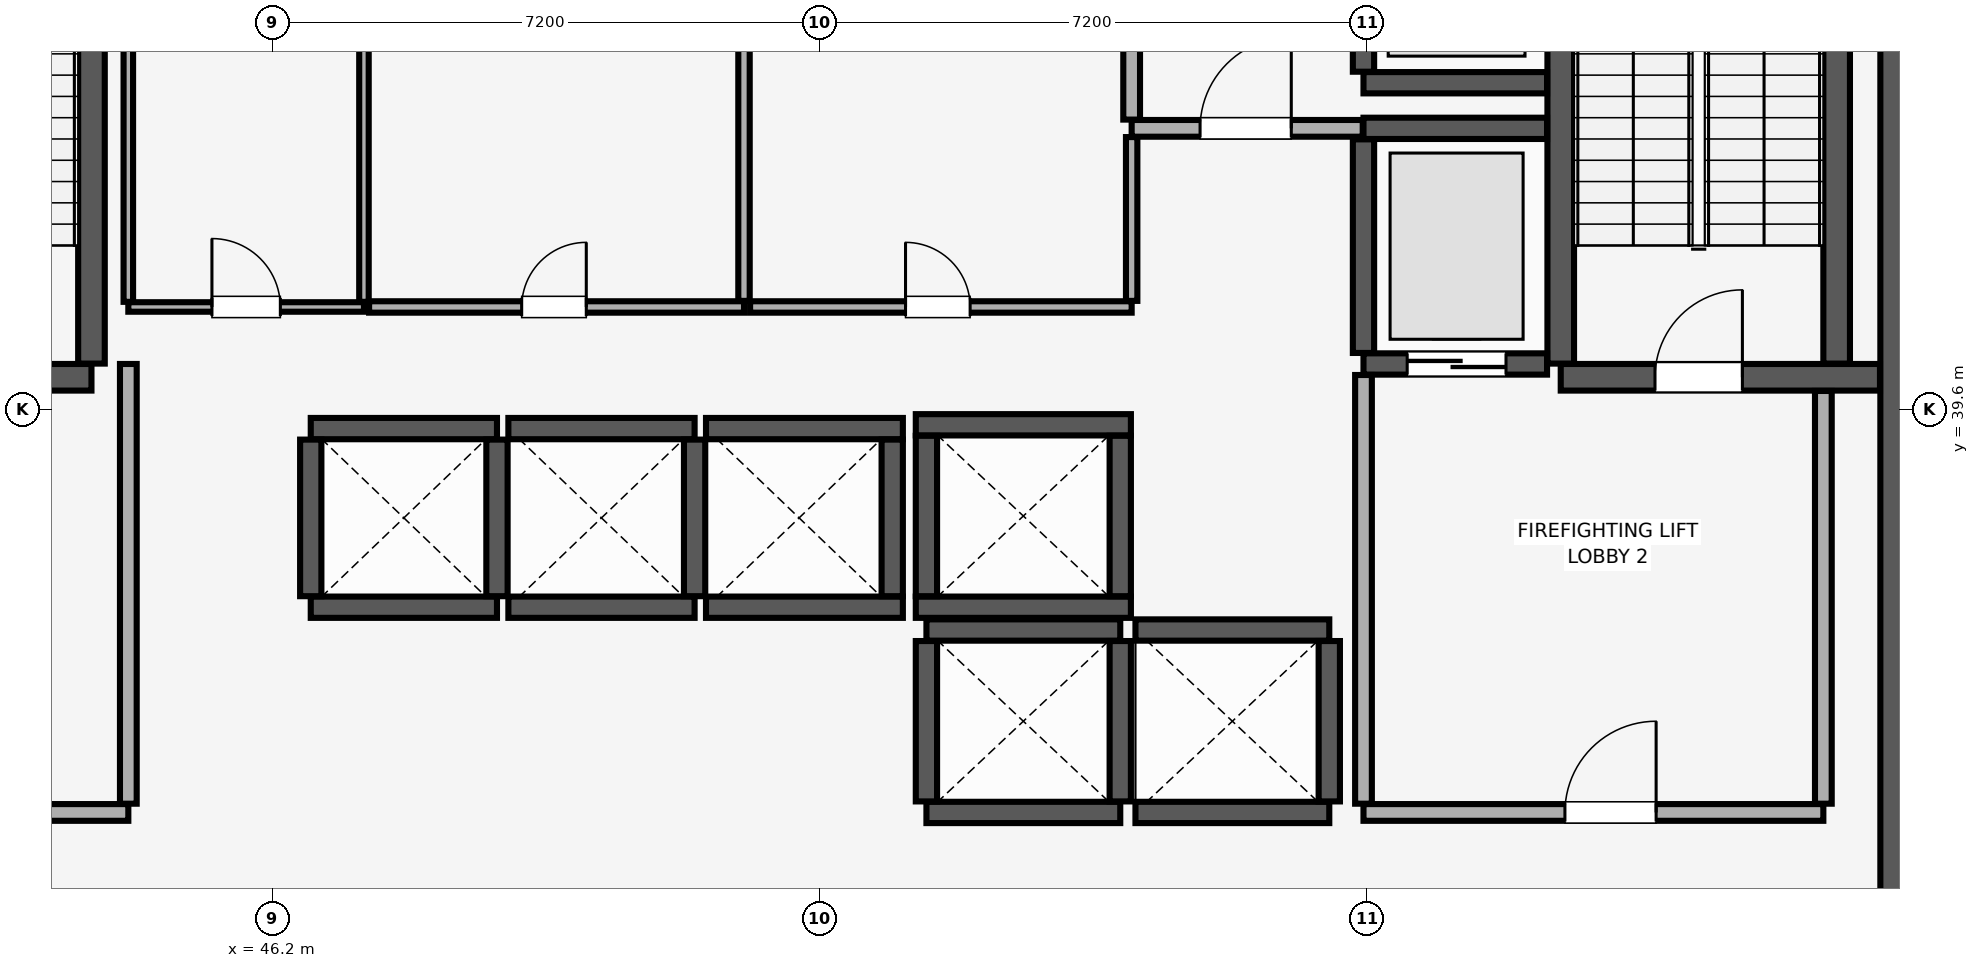
"""IFC4 building model, lengths in metres.
Left out: names, types, materials, properties, quantities, classifications, styles, units other than length and angle.
Written with IfcOpenShell. Run it as: python <this file> out.ifc"""

import sys

from ifc_helpers import new_model, si_unit, direction, frame, frame_2d, origin, place, context, subcontext, project, spatial, rectangle, extrude, element, fill, save


model = new_model("IFC4")
c1 = context("Model", 3, precision=1e-05, world=origin(), true_north=direction((0.0, 1.0)))
c2 = subcontext(c1, "Body", "Model", "MODEL_VIEW")
j1 = project(units=[si_unit("LENGTHUNIT", "METRE"), si_unit("PLANEANGLEUNIT", "RADIAN")], contexts=[c1])
p1 = place(None, origin())
s1 = spatial("IfcSite", under=j1, at=p1, CompositionType="ELEMENT")
p2 = place(p1, origin())
s2 = spatial("IfcBuilding", under=s1, at=p2, CompositionType="ELEMENT")
p3 = place(p2, frame((0.0, 0.0, 104.3)))
s3 = spatial("IfcBuildingStorey", under=s2, at=p3, CompositionType="ELEMENT", Elevation=104.3)
p4 = place(p3, frame((67.8, 29.4, 0.0), z_axis=(0.0, 0.0, 1.0), x_axis=(0.0, 1.0, 0.0)))
e1 = element("IfcWall", 1, at=p4, inside=s3, PredefinedType="SHEAR", context=c2, shape_type="SweptSolid", body=[
    extrude(rectangle(XDim=19.2, YDim=0.9, at=frame_2d((9.6, 0.0))), origin(), (0.0, 0.0, 1.0), 3.51),
])
p5 = place(p3, frame((40.185, 40.025, 0.0), z_axis=(0.0, 0.0, 1.0), x_axis=(1.0, 0.0, 0.0)))
e2 = element("IfcWall", 2, at=p5, inside=s3, PredefinedType="SHEAR", context=c2, shape_type="SweptSolid", body=[
    extrude(rectangle(XDim=3.63, YDim=0.35, at=frame_2d((1.815, 0.0))), origin(), (0.0, 0.0, 1.0), 3.51),
])
p6 = place(p5, frame((1.24, 0.0, 0.0)))
e3 = element("IfcOpeningElement", 3, at=p6, cuts=e2, PredefinedType="OPENING", context=c2, shape_type="SweptSolid", body=[
    extrude(rectangle(XDim=1.15, YDim=2.15, at=frame_2d((0.575, 1.075))), frame((0.0, 0.185, 0.0), z_axis=(0.0, -1.0, 0.0), x_axis=(1.0, 0.0, 0.0)), (0.0, 0.0, 1.0), 0.37),
])
p7 = place(p3, frame((43.815, 40.205, 0.0), z_axis=(0.0, 0.0, 1.0), x_axis=(0.0, 1.0, 0.0)))
e4 = element("IfcWall", 4, at=p7, inside=s3, PredefinedType="SHEAR", context=c2, shape_type="SweptSolid", body=[
    extrude(rectangle(XDim=8.09, YDim=0.35, at=frame_2d((4.045, 0.0))), origin(), (0.0, 0.0, 1.0), 3.51),
])
p8 = place(p3, frame((63.145, 40.025, 0.0), z_axis=(0.0, 0.0, 1.0), x_axis=(1.0, 0.0, 0.0)))
e5 = element("IfcWall", 5, at=p8, inside=s3, PredefinedType="SHEAR", context=c2, shape_type="SweptSolid", body=[
    extrude(rectangle(XDim=4.2, YDim=0.35, at=frame_2d((2.1, 0.0))), origin(), (0.0, 0.0, 1.0), 3.51),
])
p9 = place(p8, frame((1.24, 0.0, 0.0)))
e6 = element("IfcOpeningElement", 6, at=p9, cuts=e5, PredefinedType="OPENING", context=c2, shape_type="SweptSolid", body=[
    extrude(rectangle(XDim=1.15, YDim=2.15, at=frame_2d((0.575, 1.075))), frame((0.0, 0.185, 0.0), z_axis=(0.0, -1.0, 0.0), x_axis=(1.0, 0.0, 0.0)), (0.0, 0.0, 1.0), 0.37),
])
for number, where, z_axis, x_axis in (
    (7, (63.145, 40.205, 0.0), (0.0, 0.0, 1.0), (0.0, 1.0, 0.0)),
    (8, (66.775, 40.205, 0.0), (0.0, 0.0, 1.0), (0.0, 1.0, 0.0)),
):
    element("IfcWall", number, at=place(p3, frame(where, z_axis=z_axis, x_axis=x_axis)), inside=s3, PredefinedType="SHEAR", context=c2, shape_type="SweptSolid", body=[
        extrude(rectangle(XDim=8.09, YDim=0.35, at=frame_2d((4.045, 0.0))), origin(), (0.0, 0.0, 1.0), 3.51),
    ])
for number, where, z_axis, x_axis in (
    (9, (46.7, 37.0, 0.0), (0.0, 0.0, 1.0), (1.0, 0.0, 0.0)),
    (10, (46.7, 39.35, 0.0), (0.0, 0.0, 1.0), (1.0, 0.0, 0.0)),
):
    element("IfcWall", number, at=place(p3, frame(where, z_axis=z_axis, x_axis=x_axis)), inside=s3, PredefinedType="SHEAR", context=c2, shape_type="SweptSolid", body=[
        extrude(rectangle(XDim=2.45, YDim=0.28, at=frame_2d((1.225, 0.0))), origin(), (0.0, 0.0, 1.0), 3.51),
    ])
for number, where, z_axis, x_axis in (
    (11, (46.7, 37.145, 0.0), (0.0, 0.0, 1.0), (0.0, 1.0, 0.0)),
    (12, (49.15, 37.145, 0.0), (0.0, 0.0, 1.0), (0.0, 1.0, 0.0)),
):
    element("IfcWall", number, at=place(p3, frame(where, z_axis=z_axis, x_axis=x_axis)), inside=s3, PredefinedType="SHEAR", context=c2, shape_type="SweptSolid", body=[
        extrude(rectangle(XDim=2.06, YDim=0.28, at=frame_2d((1.03, 0.0))), origin(), (0.0, 0.0, 1.0), 3.51),
    ])
for number, where, z_axis, x_axis in (
    (13, (49.3, 37.0, 0.0), (0.0, 0.0, 1.0), (1.0, 0.0, 0.0)),
    (14, (49.3, 39.35, 0.0), (0.0, 0.0, 1.0), (1.0, 0.0, 0.0)),
):
    element("IfcWall", number, at=place(p3, frame(where, z_axis=z_axis, x_axis=x_axis)), inside=s3, PredefinedType="SHEAR", context=c2, shape_type="SweptSolid", body=[
        extrude(rectangle(XDim=2.45, YDim=0.28, at=frame_2d((1.225, 0.0))), origin(), (0.0, 0.0, 1.0), 3.51),
    ])
p10 = place(p3, frame((51.75, 37.145, 0.0), z_axis=(0.0, 0.0, 1.0), x_axis=(0.0, 1.0, 0.0)))
e15 = element("IfcWall", 15, at=p10, inside=s3, PredefinedType="SHEAR", context=c2, shape_type="SweptSolid", body=[
    extrude(rectangle(XDim=2.06, YDim=0.28, at=frame_2d((1.03, 0.0))), origin(), (0.0, 0.0, 1.0), 3.51),
])
for number, where, z_axis, x_axis in (
    (16, (51.9, 37.0, 0.0), (0.0, 0.0, 1.0), (1.0, 0.0, 0.0)),
    (17, (51.9, 39.35, 0.0), (0.0, 0.0, 1.0), (1.0, 0.0, 0.0)),
):
    element("IfcWall", number, at=place(p3, frame(where, z_axis=z_axis, x_axis=x_axis)), inside=s3, PredefinedType="SHEAR", context=c2, shape_type="SweptSolid", body=[
        extrude(rectangle(XDim=2.59, YDim=0.28, at=frame_2d((1.295, 0.0))), origin(), (0.0, 0.0, 1.0), 3.51),
    ])
p11 = place(p3, frame((54.35, 37.145, 0.0), z_axis=(0.0, 0.0, 1.0), x_axis=(0.0, 1.0, 0.0)))
e18 = element("IfcWall", 18, at=p11, inside=s3, PredefinedType="SHEAR", context=c2, shape_type="SweptSolid", body=[
    extrude(rectangle(XDim=2.06, YDim=0.28, at=frame_2d((1.03, 0.0))), origin(), (0.0, 0.0, 1.0), 3.51),
])
for number, where, z_axis, x_axis in (
    (19, (54.8, 34.3, 0.0), (0.0, 0.0, 1.0), (1.0, 0.0, 0.0)),
    (20, (54.8, 36.7, 0.0), (0.0, 0.0, 1.0), (1.0, 0.0, 0.0)),
):
    element("IfcWall", number, at=place(p3, frame(where, z_axis=z_axis, x_axis=x_axis)), inside=s3, PredefinedType="SHEAR", context=c2, shape_type="SweptSolid", body=[
        extrude(rectangle(XDim=2.55, YDim=0.28, at=frame_2d((1.275, 0.0))), origin(), (0.0, 0.0, 1.0), 3.51),
    ])
for number, where, z_axis, x_axis in (
    (21, (54.8, 34.445, 0.0), (0.0, 0.0, 1.0), (0.0, 1.0, 0.0)),
    (22, (57.35, 34.445, 0.0), (0.0, 0.0, 1.0), (0.0, 1.0, 0.0)),
):
    element("IfcWall", number, at=place(p3, frame(where, z_axis=z_axis, x_axis=x_axis)), inside=s3, PredefinedType="SHEAR", context=c2, shape_type="SweptSolid", body=[
        extrude(rectangle(XDim=2.11, YDim=0.28, at=frame_2d((1.055, 0.0))), origin(), (0.0, 0.0, 1.0), 3.51),
    ])
for number, where, z_axis, x_axis in (
    (23, (57.55, 34.3, 0.0), (0.0, 0.0, 1.0), (1.0, 0.0, 0.0)),
    (24, (57.55, 36.7, 0.0), (0.0, 0.0, 1.0), (1.0, 0.0, 0.0)),
):
    element("IfcWall", number, at=place(p3, frame(where, z_axis=z_axis, x_axis=x_axis)), inside=s3, PredefinedType="SHEAR", context=c2, shape_type="SweptSolid", body=[
        extrude(rectangle(XDim=2.55, YDim=0.28, at=frame_2d((1.275, 0.0))), origin(), (0.0, 0.0, 1.0), 3.51),
    ])
p12 = place(p3, frame((60.1, 34.445, 0.0), z_axis=(0.0, 0.0, 1.0), x_axis=(0.0, 1.0, 0.0)))
e25 = element("IfcWall", 25, at=p12, inside=s3, PredefinedType="SHEAR", context=c2, shape_type="SweptSolid", body=[
    extrude(rectangle(XDim=2.11, YDim=0.28, at=frame_2d((1.055, 0.0))), origin(), (0.0, 0.0, 1.0), 3.51),
])
for number, where, z_axis, x_axis in (
    (26, (54.66, 37.0, 0.0), (0.0, 0.0, 1.0), (1.0, 0.0, 0.0)),
    (27, (54.66, 39.4, 0.0), (0.0, 0.0, 1.0), (1.0, 0.0, 0.0)),
):
    element("IfcWall", number, at=place(p3, frame(where, z_axis=z_axis, x_axis=x_axis)), inside=s3, PredefinedType="SHEAR", context=c2, shape_type="SweptSolid", body=[
        extrude(rectangle(XDim=2.83, YDim=0.28, at=frame_2d((1.415, 0.0))), origin(), (0.0, 0.0, 1.0), 3.51),
    ])
for number, where, z_axis, x_axis in (
    (28, (54.8, 37.145, 0.0), (0.0, 0.0, 1.0), (0.0, 1.0, 0.0)),
    (29, (57.35, 37.145, 0.0), (0.0, 0.0, 1.0), (0.0, 1.0, 0.0)),
):
    element("IfcWall", number, at=place(p3, frame(where, z_axis=z_axis, x_axis=x_axis)), inside=s3, PredefinedType="SHEAR", context=c2, shape_type="SweptSolid", body=[
        extrude(rectangle(XDim=2.11, YDim=0.28, at=frame_2d((1.055, 0.0))), origin(), (0.0, 0.0, 1.0), 3.51),
    ])
p13 = place(p3, frame((60.55, 40.2, 0.0), z_axis=(0.0, 0.0, 1.0), x_axis=(1.0, 0.0, 0.0)))
e30 = element("IfcWall", 30, at=p13, inside=s3, PredefinedType="SHEAR", context=c2, shape_type="SweptSolid", body=[
    extrude(rectangle(XDim=2.415, YDim=0.28, at=frame_2d((1.208, 0.0))), origin(), (0.0, 0.0, 1.0), 3.51),
])
p14 = place(p13, frame((0.575, 0.0, 0.0)))
e31 = element("IfcOpeningElement", 31, at=p14, cuts=e30, PredefinedType="OPENING", context=c2, shape_type="SweptSolid", body=[
    extrude(rectangle(XDim=1.3, YDim=2.3, at=frame_2d((0.65, 1.15))), frame((0.0, 0.15, 0.0), z_axis=(0.0, -1.0, 0.0), x_axis=(1.0, 0.0, 0.0)), (0.0, 0.0, 1.0), 0.3),
])
p15 = place(p3, frame((60.55, 43.3, 0.0), z_axis=(0.0, 0.0, 1.0), x_axis=(1.0, 0.0, 0.0)))
e32 = element("IfcWall", 32, at=p15, inside=s3, PredefinedType="SHEAR", context=c2, shape_type="SweptSolid", body=[
    extrude(rectangle(XDim=2.415, YDim=0.28, at=frame_2d((1.208, 0.0))), origin(), (0.0, 0.0, 1.0), 3.51),
])
p16 = place(p3, frame((60.55, 40.345, 0.0), z_axis=(0.0, 0.0, 1.0), x_axis=(0.0, 1.0, 0.0)))
e33 = element("IfcWall", 33, at=p16, inside=s3, PredefinedType="SHEAR", context=c2, shape_type="SweptSolid", body=[
    extrude(rectangle(XDim=2.81, YDim=0.28, at=frame_2d((1.405, 0.0))), origin(), (0.0, 0.0, 1.0), 3.51),
])
p17 = place(p3, frame((60.55, 43.9, 0.0), z_axis=(0.0, 0.0, 1.0), x_axis=(1.0, 0.0, 0.0)))
e34 = element("IfcWall", 34, at=p17, inside=s3, PredefinedType="SHEAR", context=c2, shape_type="SweptSolid", body=[
    extrude(rectangle(XDim=2.415, YDim=0.28, at=frame_2d((1.208, 0.0))), origin(), (0.0, 0.0, 1.0), 3.51),
])
p18 = place(p3, frame((60.55, 44.045, 0.0), z_axis=(0.0, 0.0, 1.0), x_axis=(0.0, 1.0, 0.0)))
e35 = element("IfcWall", 35, at=p18, inside=s3, PredefinedType="SHEAR", context=c2, shape_type="SweptSolid", body=[
    extrude(rectangle(XDim=3.11, YDim=0.28, at=frame_2d((1.555, 0.0))), origin(), (0.0, 0.0, 1.0), 3.51),
])
p19 = place(p18, frame((0.905, 0.0, 0.0)))
e36 = element("IfcOpeningElement", 36, at=p19, cuts=e35, PredefinedType="OPENING", context=c2, shape_type="SweptSolid", body=[
    extrude(rectangle(XDim=1.3, YDim=2.3, at=frame_2d((0.65, 1.15))), frame((0.0, 0.15, 0.0), z_axis=(0.0, -1.0, 0.0), x_axis=(1.0, 0.0, 0.0)), (0.0, 0.0, 1.0), 0.3),
])
p20 = place(p3, frame((60.55, 34.3, 0.0), z_axis=(0.0, 0.0, 1.0), x_axis=(1.0, 0.0, 0.0)))
e37 = element("IfcWall", 37, at=p20, inside=s3, PredefinedType="PARTITIONING", context=c2, shape_type="SweptSolid", body=[
    extrude(rectangle(XDim=6.05, YDim=0.22, at=frame_2d((3.025, 0.0))), origin(), (0.0, 0.0, 1.0), 3.51),
])
p21 = place(p20, frame((2.65, 0.0, 0.0)))
e38 = element("IfcOpeningElement", 38, at=p21, cuts=e37, PredefinedType="OPENING", context=c2, shape_type="SweptSolid", body=[
    extrude(rectangle(XDim=1.2, YDim=2.15, at=frame_2d((0.6, 1.075))), frame((0.0, 0.12, 0.0), z_axis=(0.0, -1.0, 0.0), x_axis=(1.0, 0.0, 0.0)), (0.0, 0.0, 1.0), 0.24),
])
p22 = place(p3, frame((60.55, 34.415, 0.0), z_axis=(0.0, 0.0, 1.0), x_axis=(0.0, 1.0, 0.0)))
e39 = element("IfcWall", 39, at=p22, inside=s3, PredefinedType="PARTITIONING", context=c2, shape_type="SweptSolid", body=[
    extrude(rectangle(XDim=5.64, YDim=0.22, at=frame_2d((2.82, 0.0))), origin(), (0.0, 0.0, 1.0), 3.51),
])
p23 = place(p3, frame((66.6, 34.415, 0.0), z_axis=(0.0, 0.0, 1.0), x_axis=(0.0, 1.0, 0.0)))
e40 = element("IfcWall", 40, at=p23, inside=s3, PredefinedType="PARTITIONING", context=c2, shape_type="SweptSolid", body=[
    extrude(rectangle(XDim=5.43, YDim=0.22, at=frame_2d((2.715, 0.0))), origin(), (0.0, 0.0, 1.0), 3.51),
])
p24 = place(p3, frame((39.7, 34.3, 0.0), z_axis=(0.0, 0.0, 1.0), x_axis=(1.0, 0.0, 0.0)))
e41 = element("IfcWall", 41, at=p24, inside=s3, PredefinedType="PARTITIONING", context=c2, shape_type="SweptSolid", body=[
    extrude(rectangle(XDim=4.6, YDim=0.22, at=frame_2d((2.3, 0.0))), origin(), (0.0, 0.0, 1.0), 3.51),
])
p25 = place(p24, frame((1.7, 0.0, 0.0)))
e42 = element("IfcOpeningElement", 42, at=p25, cuts=e41, PredefinedType="OPENING", context=c2, shape_type="SweptSolid", body=[
    extrude(rectangle(XDim=1.2, YDim=2.15, at=frame_2d((0.6, 1.075))), frame((0.0, 0.12, 0.0), z_axis=(0.0, -1.0, 0.0), x_axis=(1.0, 0.0, 0.0)), (0.0, 0.0, 1.0), 0.24),
])
p26 = place(p3, frame((44.3, 34.415, 0.0), z_axis=(0.0, 0.0, 1.0), x_axis=(0.0, 1.0, 0.0)))
e43 = element("IfcWall", 43, at=p26, inside=s3, PredefinedType="PARTITIONING", context=c2, shape_type="SweptSolid", body=[
    extrude(rectangle(XDim=5.785, YDim=0.22, at=frame_2d((2.893, 0.0))), origin(), (0.0, 0.0, 1.0), 3.51),
])
p27 = place(p3, frame((57.5, 43.3, 0.0), z_axis=(0.0, 0.0, 1.0), x_axis=(1.0, 0.0, 0.0)))
e44 = element("IfcWall", 44, at=p27, inside=s3, PredefinedType="PARTITIONING", context=c2, shape_type="SweptSolid", body=[
    extrude(rectangle(XDim=3.04, YDim=0.22, at=frame_2d((1.52, 0.0))), origin(), (0.0, 0.0, 1.0), 3.51),
])
p28 = place(p27, frame((0.9, 0.0, 0.0)))
e45 = element("IfcOpeningElement", 45, at=p28, cuts=e44, PredefinedType="OPENING", context=c2, shape_type="SweptSolid", body=[
    extrude(rectangle(XDim=1.2, YDim=2.15, at=frame_2d((0.6, 1.075))), frame((0.0, 0.12, 0.0), z_axis=(0.0, -1.0, 0.0), x_axis=(1.0, 0.0, 0.0)), (0.0, 0.0, 1.0), 0.24),
])
p29 = place(p3, frame((57.5, 43.415, 0.0), z_axis=(0.0, 0.0, 1.0), x_axis=(0.0, 1.0, 0.0)))
e46 = element("IfcWall", 46, at=p29, inside=s3, PredefinedType="PARTITIONING", context=c2, shape_type="SweptSolid", body=[
    extrude(rectangle(XDim=5.435, YDim=0.22, at=frame_2d((2.718, 0.0))), origin(), (0.0, 0.0, 1.0), 3.51),
])
p30 = place(p3, frame((44.3, 40.95, 0.0), z_axis=(0.0, 0.0, 1.0), x_axis=(1.0, 0.0, 0.0)))
e47 = element("IfcWall", 47, at=p30, inside=s3, PredefinedType="PARTITIONING", context=c2, shape_type="SweptSolid", body=[
    extrude(rectangle(XDim=3.1, YDim=0.125, at=frame_2d((1.55, 0.0))), origin(), (0.0, 0.0, 1.0), 3.51),
])
p31 = place(p30, frame((1.1, 0.0, 0.0)))
e48 = element("IfcOpeningElement", 48, at=p31, cuts=e47, PredefinedType="OPENING", context=c2, shape_type="SweptSolid", body=[
    extrude(rectangle(XDim=0.9, YDim=2.1, at=frame_2d((0.45, 1.05))), frame((0.0, 0.073, 0.0), z_axis=(0.0, -1.0, 0.0), x_axis=(1.0, 0.0, 0.0)), (0.0, 0.0, 1.0), 0.145),
])
for number, where, z_axis, x_axis in (
    (49, (44.3, 41.018, 0.0), (0.0, 0.0, 1.0), (0.0, 1.0, 0.0)),
    (50, (47.4, 41.018, 0.0), (0.0, 0.0, 1.0), (0.0, 1.0, 0.0)),
):
    element("IfcWall", number, at=place(p3, frame(where, z_axis=z_axis, x_axis=x_axis)), inside=s3, PredefinedType="PARTITIONING", context=c2, shape_type="SweptSolid", body=[
        extrude(rectangle(XDim=7.833, YDim=0.125, at=frame_2d((3.916, 0.0))), origin(), (0.0, 0.0, 1.0), 3.51),
    ])
p32 = place(p3, frame((47.468, 40.95, 0.0), z_axis=(0.0, 0.0, 1.0), x_axis=(1.0, 0.0, 0.0)))
e51 = element("IfcWall", 51, at=p32, inside=s3, PredefinedType="PARTITIONING", context=c2, shape_type="SweptSolid", body=[
    extrude(rectangle(XDim=4.932, YDim=0.15, at=frame_2d((2.466, 0.0))), origin(), (0.0, 0.0, 1.0), 3.51),
])
p33 = place(p32, frame((2.008, 0.0, 0.0)))
e52 = element("IfcOpeningElement", 52, at=p33, cuts=e51, PredefinedType="OPENING", context=c2, shape_type="SweptSolid", body=[
    extrude(rectangle(XDim=0.85, YDim=2.1, at=frame_2d((0.425, 1.05))), frame((0.0, 0.085, 0.0), z_axis=(0.0, -1.0, 0.0), x_axis=(1.0, 0.0, 0.0)), (0.0, 0.0, 1.0), 0.17),
])
p34 = place(p3, frame((52.4, 41.03, 0.0), z_axis=(0.0, 0.0, 1.0), x_axis=(0.0, 1.0, 0.0)))
e53 = element("IfcWall", 53, at=p34, inside=s3, PredefinedType="PARTITIONING", context=c2, shape_type="SweptSolid", body=[
    extrude(rectangle(XDim=7.82, YDim=0.15, at=frame_2d((3.91, 0.0))), origin(), (0.0, 0.0, 1.0), 3.51),
])
p35 = place(p3, frame((52.48, 40.95, 0.0), z_axis=(0.0, 0.0, 1.0), x_axis=(1.0, 0.0, 0.0)))
e54 = element("IfcWall", 54, at=p35, inside=s3, PredefinedType="PARTITIONING", context=c2, shape_type="SweptSolid", body=[
    extrude(rectangle(XDim=5.02, YDim=0.15, at=frame_2d((2.51, 0.0))), origin(), (0.0, 0.0, 1.0), 3.51),
])
p36 = place(p35, frame((2.045, 0.0, 0.0)))
e55 = element("IfcOpeningElement", 55, at=p36, cuts=e54, PredefinedType="OPENING", context=c2, shape_type="SweptSolid", body=[
    extrude(rectangle(XDim=0.85, YDim=2.1, at=frame_2d((0.425, 1.05))), frame((0.0, 0.085, 0.0), z_axis=(0.0, -1.0, 0.0), x_axis=(1.0, 0.0, 0.0)), (0.0, 0.0, 1.0), 0.17),
])
p37 = place(p3, frame((57.5, 41.03, 0.0), z_axis=(0.0, 0.0, 1.0), x_axis=(0.0, 1.0, 0.0)))
e56 = element("IfcWall", 56, at=p37, inside=s3, PredefinedType="PARTITIONING", context=c2, shape_type="SweptSolid", body=[
    extrude(rectangle(XDim=2.155, YDim=0.15, at=frame_2d((1.078, 0.0))), origin(), (0.0, 0.0, 1.0), 3.51),
])
p38 = place(p9, origin())
e57 = element("IfcDoor", 57, at=p38, inside=s3, OperationType="SINGLE_SWING_RIGHT", PredefinedType="DOOR", context=c2, shape_type="SweptSolid", body=[
    extrude(rectangle(XDim=1.15, YDim=2.15, at=frame_2d((0.575, 1.075))), frame((0.0, 0.025, 0.0), z_axis=(0.0, -1.0, 0.0), x_axis=(1.0, 0.0, 0.0)), (0.0, 0.0, 1.0), 0.05),
])
fill(e6, e57)
p39 = place(p14, origin())
e58 = element("IfcDoor", 58, at=p39, inside=s3, OperationType="DOUBLE_DOOR_SLIDING", PredefinedType="DOOR", context=c2, shape_type="SweptSolid", body=[
    extrude(rectangle(XDim=1.3, YDim=2.3, at=frame_2d((0.65, 1.15))), frame((0.0, 0.025, 0.0), z_axis=(0.0, -1.0, 0.0), x_axis=(1.0, 0.0, 0.0)), (0.0, 0.0, 1.0), 0.05),
])
fill(e31, e58)
p40 = place(p21, origin())
e59 = element("IfcDoor", 59, at=p40, inside=s3, OperationType="SINGLE_SWING_RIGHT", PredefinedType="DOOR", context=c2, shape_type="SweptSolid", body=[
    extrude(rectangle(XDim=1.2, YDim=2.15, at=frame_2d((0.6, 1.075))), frame((0.0, 0.025, 0.0), z_axis=(0.0, -1.0, 0.0), x_axis=(1.0, 0.0, 0.0)), (0.0, 0.0, 1.0), 0.05),
])
fill(e38, e59)
p41 = place(p28, origin())
e60 = element("IfcDoor", 60, at=p41, inside=s3, OperationType="SINGLE_SWING_RIGHT", PredefinedType="DOOR", context=c2, shape_type="SweptSolid", body=[
    extrude(rectangle(XDim=1.2, YDim=2.15, at=frame_2d((0.6, 1.075))), frame((0.0, 0.025, 0.0), z_axis=(0.0, -1.0, 0.0), x_axis=(1.0, 0.0, 0.0)), (0.0, 0.0, 1.0), 0.05),
])
fill(e45, e60)
p42 = place(p31, origin())
e61 = element("IfcDoor", 61, at=p42, inside=s3, OperationType="SINGLE_SWING_LEFT", PredefinedType="DOOR", context=c2, shape_type="SweptSolid", body=[
    extrude(rectangle(XDim=0.9, YDim=2.1, at=frame_2d((0.45, 1.05))), frame((0.0, 0.025, 0.0), z_axis=(0.0, -1.0, 0.0), x_axis=(1.0, 0.0, 0.0)), (0.0, 0.0, 1.0), 0.05),
])
fill(e48, e61)
p43 = place(p33, origin())
e62 = element("IfcDoor", 62, at=p43, inside=s3, OperationType="SINGLE_SWING_RIGHT", PredefinedType="DOOR", context=c2, shape_type="SweptSolid", body=[
    extrude(rectangle(XDim=0.85, YDim=2.1, at=frame_2d((0.425, 1.05))), frame((0.0, 0.025, 0.0), z_axis=(0.0, -1.0, 0.0), x_axis=(1.0, 0.0, 0.0)), (0.0, 0.0, 1.0), 0.05),
])
fill(e52, e62)
p44 = place(p36, origin())
e63 = element("IfcDoor", 63, at=p44, inside=s3, OperationType="SINGLE_SWING_LEFT", PredefinedType="DOOR", context=c2, shape_type="SweptSolid", body=[
    extrude(rectangle(XDim=0.85, YDim=2.1, at=frame_2d((0.425, 1.05))), frame((0.0, 0.025, 0.0), z_axis=(0.0, -1.0, 0.0), x_axis=(1.0, 0.0, 0.0)), (0.0, 0.0, 1.0), 0.05),
])
fill(e55, e63)
save(model, sys.argv[1])
